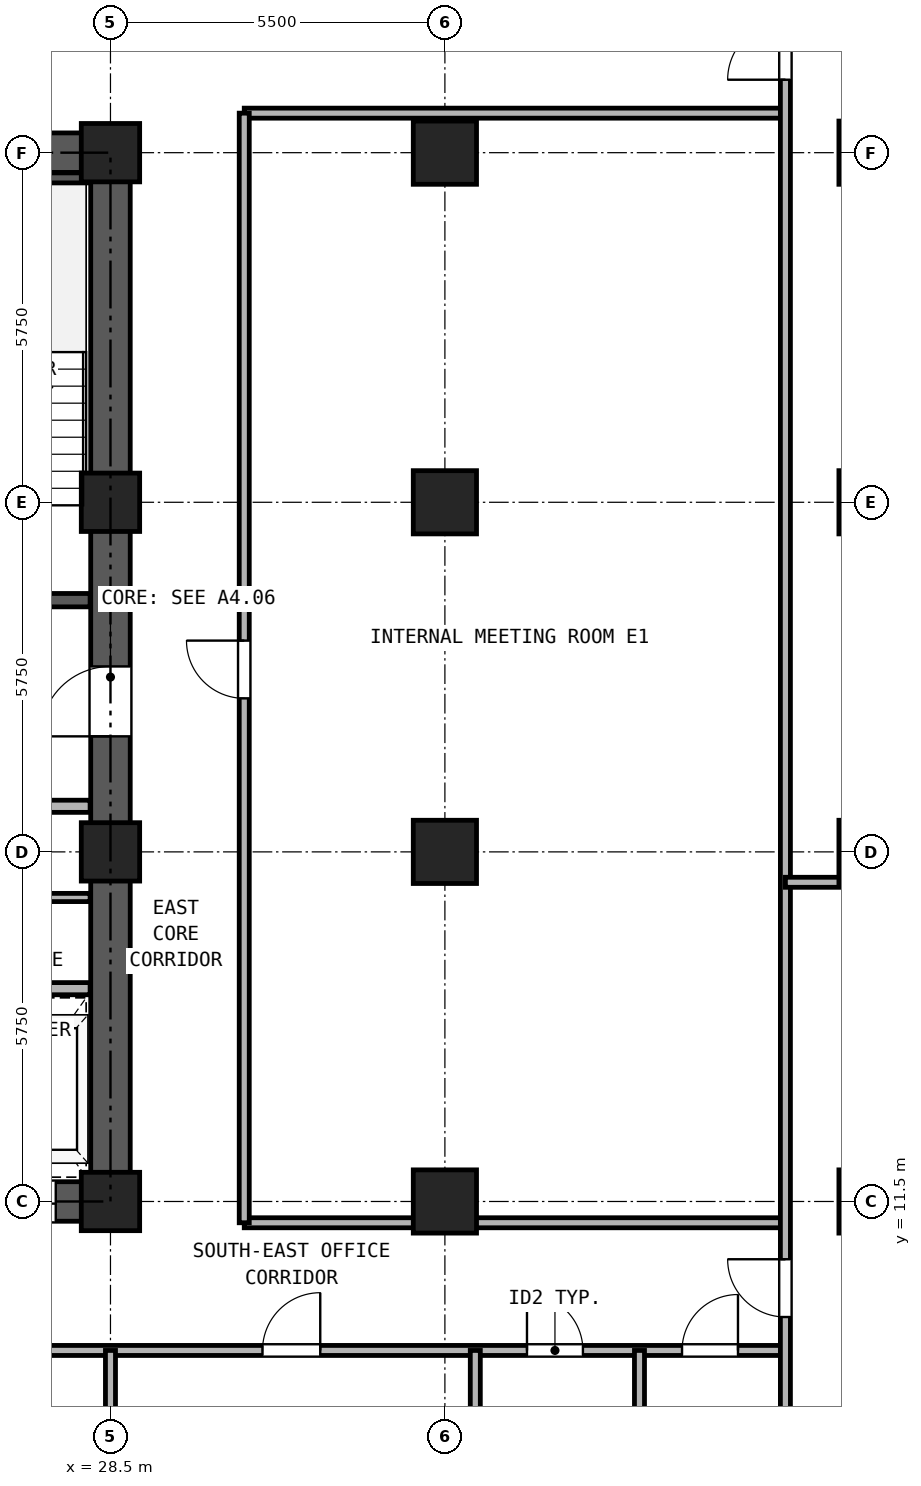
"""IFC4 building model, lengths in metres.
Left out: names, types, materials, properties, quantities, classifications, styles, units other than length and angle.
Written with IfcOpenShell. Run it as: python <this file> out.ifc"""

import sys

from ifc_helpers import new_model, si_unit, direction, frame, frame_2d, origin, origin_2d, place, context, subcontext, project, spatial, rectangle, hollow_rectangle, extrude, source, transform, mapped, element, fill, save


model = new_model("IFC4")
c1 = context("Model", 3, precision=1e-05, world=origin(), true_north=direction((0.0, 1.0)))
c2 = subcontext(c1, "Body", "Model", "MODEL_VIEW")
j1 = project(units=[si_unit("LENGTHUNIT", "METRE"), si_unit("PLANEANGLEUNIT", "RADIAN")], contexts=[c1])
p1 = place(None, origin())
s1 = spatial("IfcSite", under=j1, at=p1, CompositionType="ELEMENT")
p2 = place(p1, origin())
s2 = spatial("IfcBuilding", under=s1, at=p2, CompositionType="ELEMENT")
p3 = place(p2, frame((0.0, 0.0, 40.5)))
s3 = spatial("IfcBuildingStorey", under=s2, at=p3, CompositionType="ELEMENT", Elevation=40.5)
m1 = source(origin(), c2, "Body", "SweptSolid", [
    extrude(hollow_rectangle(XDim=0.96, YDim=0.96, WallThickness=0.06, at=origin_2d()), origin(), (0.0, 0.0, 1.0), 3.32),
])
for number, where, z_axis, x_axis in (
    (1, (28.5, 11.5, 0.0), (0.0, 0.0, 1.0), (1.0, 0.0, 0.0)),
    (2, (28.5, 17.25, 0.0), (0.0, 0.0, 1.0), (1.0, 0.0, 0.0)),
    (3, (28.5, 23.0, 0.0), (0.0, 0.0, 1.0), (1.0, 0.0, 0.0)),
    (4, (28.5, 28.75, 0.0), (0.0, 0.0, 1.0), (1.0, 0.0, 0.0)),
):
    element("IfcColumn", number, at=place(p3, frame(where, z_axis=z_axis, x_axis=x_axis)), inside=s3, PredefinedType="COLUMN", context=c2, shape_type="MappedRepresentation", body=[
        mapped(m1, transform((0.0, 0.0, 0.0), x_axis=(1.0, 0.0, 0.0), y_axis=(0.0, 1.0, 0.0), z_axis=(0.0, 0.0, 1.0), scale=1.0)),
    ])
m2 = source(origin(), c2, "Body", "SweptSolid", [
    extrude(hollow_rectangle(XDim=1.04, YDim=1.04, WallThickness=0.065, at=origin_2d()), origin(), (0.0, 0.0, 1.0), 3.32),
])
for number, where, z_axis, x_axis in (
    (5, (34.0, 11.5, 0.0), (0.0, 0.0, 1.0), (1.0, 0.0, 0.0)),
    (6, (34.0, 17.25, 0.0), (0.0, 0.0, 1.0), (1.0, 0.0, 0.0)),
    (7, (34.0, 23.0, 0.0), (0.0, 0.0, 1.0), (1.0, 0.0, 0.0)),
    (8, (34.0, 28.75, 0.0), (0.0, 0.0, 1.0), (1.0, 0.0, 0.0)),
    (9, (41.0, 11.5, 0.0), (0.0, 0.0, 1.0), (1.0, 0.0, 0.0)),
    (10, (41.0, 17.25, 0.0), (0.0, 0.0, 1.0), (1.0, 0.0, 0.0)),
    (11, (41.0, 23.0, 0.0), (0.0, 0.0, 1.0), (1.0, 0.0, 0.0)),
    (12, (41.0, 28.75, 0.0), (0.0, 0.0, 1.0), (1.0, 0.0, 0.0)),
):
    element("IfcColumn", number, at=place(p3, frame(where, z_axis=z_axis, x_axis=x_axis)), inside=s3, PredefinedType="COLUMN", context=c2, shape_type="MappedRepresentation", body=[
        mapped(m2, transform((0.0, 0.0, 0.0), x_axis=(1.0, 0.0, 0.0), y_axis=(0.0, 1.0, 0.0), z_axis=(0.0, 0.0, 1.0), scale=1.0)),
    ])
p4 = place(p3, frame((18.175, 11.5, 0.0), z_axis=(0.0, 0.0, 1.0), x_axis=(1.0, 0.0, 0.0)))
e13 = element("IfcWall", 13, at=p4, inside=s3, PredefinedType="SHEAR", context=c2, shape_type="SweptSolid", body=[
    extrude(rectangle(XDim=10.65, YDim=0.65, at=frame_2d((5.325, 0.0))), origin(), (0.0, 0.0, 1.0), 3.32),
])
p5 = place(p4, frame((1.195, 0.0, 0.0)))
e14 = element("IfcOpeningElement", 14, at=p5, cuts=e13, PredefinedType="OPENING", context=c2, shape_type="SweptSolid", body=[
    extrude(rectangle(XDim=1.1, YDim=2.25, at=frame_2d((0.55, 1.125))), frame((0.0, 0.335, 0.0), z_axis=(0.0, -1.0, 0.0), x_axis=(1.0, 0.0, 0.0)), (0.0, 0.0, 1.0), 0.67),
])
p6 = place(p4, frame((3.495, 0.0, 0.0)))
e15 = element("IfcOpeningElement", 15, at=p6, cuts=e13, PredefinedType="OPENING", context=c2, shape_type="SweptSolid", body=[
    extrude(rectangle(XDim=1.1, YDim=2.25, at=frame_2d((0.55, 1.125))), frame((0.0, 0.335, 0.0), z_axis=(0.0, -1.0, 0.0), x_axis=(1.0, 0.0, 0.0)), (0.0, 0.0, 1.0), 0.67),
])
p7 = place(p4, frame((5.925, 0.0, 0.0)))
e16 = element("IfcOpeningElement", 16, at=p7, cuts=e13, PredefinedType="OPENING", context=c2, shape_type="SweptSolid", body=[
    extrude(rectangle(XDim=1.1, YDim=2.25, at=frame_2d((0.55, 1.125))), frame((0.0, 0.335, 0.0), z_axis=(0.0, -1.0, 0.0), x_axis=(1.0, 0.0, 0.0)), (0.0, 0.0, 1.0), 0.67),
])
p8 = place(p4, frame((8.325, 0.0, 0.0)))
e17 = element("IfcOpeningElement", 17, at=p8, cuts=e13, PredefinedType="OPENING", context=c2, shape_type="SweptSolid", body=[
    extrude(rectangle(XDim=1.1, YDim=2.25, at=frame_2d((0.55, 1.125))), frame((0.0, 0.335, 0.0), z_axis=(0.0, -1.0, 0.0), x_axis=(1.0, 0.0, 0.0)), (0.0, 0.0, 1.0), 0.67),
])
p9 = place(p3, frame((18.175, 28.75, 0.0), z_axis=(0.0, 0.0, 1.0), x_axis=(1.0, 0.0, 0.0)))
e18 = element("IfcWall", 18, at=p9, inside=s3, PredefinedType="SHEAR", context=c2, shape_type="SweptSolid", body=[
    extrude(rectangle(XDim=10.65, YDim=0.65, at=frame_2d((5.325, 0.0))), origin(), (0.0, 0.0, 1.0), 3.32),
])
p10 = place(p9, frame((4.205, 0.0, 0.0)))
e19 = element("IfcOpeningElement", 19, at=p10, cuts=e18, PredefinedType="OPENING", context=c2, shape_type="SweptSolid", body=[
    extrude(rectangle(XDim=0.9, YDim=2.05, at=frame_2d((0.45, 1.025))), frame((0.0, 0.335, 0.0), z_axis=(0.0, -1.0, 0.0), x_axis=(1.0, 0.0, 0.0)), (0.0, 0.0, 1.0), 0.67),
])
p11 = place(p9, frame((5.745, 0.0, 0.0)))
e20 = element("IfcOpeningElement", 20, at=p11, cuts=e18, PredefinedType="OPENING", context=c2, shape_type="SweptSolid", body=[
    extrude(rectangle(XDim=0.9, YDim=2.05, at=frame_2d((0.45, 1.025))), frame((0.0, 0.335, 0.0), z_axis=(0.0, -1.0, 0.0), x_axis=(1.0, 0.0, 0.0)), (0.0, 0.0, 1.0), 0.67),
])
p12 = place(p3, frame((28.5, 11.825, 0.0), z_axis=(0.0, 0.0, 1.0), x_axis=(0.0, 1.0, 0.0)))
e21 = element("IfcWall", 21, at=p12, inside=s3, PredefinedType="SHEAR", context=c2, shape_type="SweptSolid", body=[
    extrude(rectangle(XDim=16.6, YDim=0.65, at=frame_2d((8.3, 0.0))), origin(), (0.0, 0.0, 1.0), 3.32),
])
p13 = place(p12, frame((7.325, 0.0, 0.0)))
e22 = element("IfcOpeningElement", 22, at=p13, cuts=e21, PredefinedType="OPENING", context=c2, shape_type="SweptSolid", body=[
    extrude(rectangle(XDim=1.15, YDim=2.2, at=frame_2d((0.575, 1.1))), frame((0.0, 0.335, 0.0), z_axis=(0.0, -1.0, 0.0), x_axis=(1.0, 0.0, 0.0)), (0.0, 0.0, 1.0), 0.67),
])
p14 = place(p3, frame((25.13, 28.335, 0.0), z_axis=(0.0, 0.0, 1.0), x_axis=(1.0, 0.0, 0.0)))
e23 = element("IfcWall", 23, at=p14, inside=s3, PredefinedType="PARTITIONING", context=c2, shape_type="SweptSolid", body=[
    extrude(rectangle(XDim=3.035, YDim=0.165, at=frame_2d((1.518, 0.0))), origin(), (0.0, 0.0, 1.0), 3.32),
])
p15 = place(p3, frame((25.13, 21.39, 0.0), z_axis=(0.0, 0.0, 1.0), x_axis=(1.0, 0.0, 0.0)))
e24 = element("IfcWall", 24, at=p15, inside=s3, PredefinedType="SOLIDWALL", context=c2, shape_type="SweptSolid", body=[
    extrude(rectangle(XDim=3.035, YDim=0.22, at=frame_2d((1.518, 0.0))), origin(), (0.0, 0.0, 1.0), 3.32),
])
p16 = place(p15, frame((0.92, 0.0, 0.0)))
e25 = element("IfcOpeningElement", 25, at=p16, cuts=e24, PredefinedType="OPENING", context=c2, shape_type="SweptSolid", body=[
    extrude(rectangle(XDim=1.15, YDim=2.2, at=frame_2d((0.575, 1.1))), frame((0.0, 0.12, 0.0), z_axis=(0.0, -1.0, 0.0), x_axis=(1.0, 0.0, 0.0)), (0.0, 0.0, 1.0), 0.24),
])
p17 = place(p3, frame((18.835, 18.0, 0.0), z_axis=(0.0, 0.0, 1.0), x_axis=(1.0, 0.0, 0.0)))
e26 = element("IfcWall", 26, at=p17, inside=s3, PredefinedType="PARTITIONING", context=c2, shape_type="SweptSolid", body=[
    extrude(rectangle(XDim=9.33, YDim=0.2, at=frame_2d((4.665, 0.0))), origin(), (0.0, 0.0, 1.0), 3.32),
])
p18 = place(p17, frame((0.415, 0.0, 0.0)))
e27 = element("IfcOpeningElement", 27, at=p18, cuts=e26, PredefinedType="OPENING", context=c2, shape_type="SweptSolid", body=[
    extrude(rectangle(XDim=1.3, YDim=2.3, at=frame_2d((0.65, 1.15))), frame((0.0, 0.11, 0.0), z_axis=(0.0, -1.0, 0.0), x_axis=(1.0, 0.0, 0.0)), (0.0, 0.0, 1.0), 0.22),
])
p19 = place(p17, frame((2.515, 0.0, 0.0)))
e28 = element("IfcOpeningElement", 28, at=p19, cuts=e26, PredefinedType="OPENING", context=c2, shape_type="SweptSolid", body=[
    extrude(rectangle(XDim=1.3, YDim=2.3, at=frame_2d((0.65, 1.15))), frame((0.0, 0.11, 0.0), z_axis=(0.0, -1.0, 0.0), x_axis=(1.0, 0.0, 0.0)), (0.0, 0.0, 1.0), 0.22),
])
p20 = place(p17, frame((7.015, 0.0, 0.0)))
e29 = element("IfcOpeningElement", 29, at=p20, cuts=e26, PredefinedType="OPENING", context=c2, shape_type="SweptSolid", body=[
    extrude(rectangle(XDim=1.0, YDim=2.15, at=frame_2d((0.5, 1.075))), frame((0.0, 0.11, 0.0), z_axis=(0.0, -1.0, 0.0), x_axis=(1.0, 0.0, 0.0)), (0.0, 0.0, 1.0), 0.22),
])
p21 = place(p3, frame((18.835, 15.0, 0.0), z_axis=(0.0, 0.0, 1.0), x_axis=(1.0, 0.0, 0.0)))
e30 = element("IfcWall", 30, at=p21, inside=s3, PredefinedType="PARTITIONING", context=c2, shape_type="SweptSolid", body=[
    extrude(rectangle(XDim=9.33, YDim=0.2, at=frame_2d((4.665, 0.0))), origin(), (0.0, 0.0, 1.0), 3.32),
])
p22 = place(p3, frame((23.3, 16.5, 0.0), z_axis=(0.0, 0.0, 1.0), x_axis=(1.0, 0.0, 0.0)))
e31 = element("IfcWall", 31, at=p22, inside=s3, PredefinedType="PARTITIONING", context=c2, shape_type="SweptSolid", body=[
    extrude(rectangle(XDim=4.865, YDim=0.135, at=frame_2d((2.433, 0.0))), origin(), (0.0, 0.0, 1.0), 3.32),
])
p23 = place(p22, frame((2.55, 0.0, 0.0)))
e32 = element("IfcOpeningElement", 32, at=p23, cuts=e31, PredefinedType="OPENING", context=c2, shape_type="SweptSolid", body=[
    extrude(rectangle(XDim=0.9, YDim=2.05, at=frame_2d((0.45, 1.025))), frame((0.0, 0.077, 0.0), z_axis=(0.0, -1.0, 0.0), x_axis=(1.0, 0.0, 0.0)), (0.0, 0.0, 1.0), 0.155),
])
p24 = place(p3, frame((7.4, 9.05, 0.0), z_axis=(0.0, 0.0, 1.0), x_axis=(1.0, 0.0, 0.0)))
e33 = element("IfcWall", 33, at=p24, inside=s3, PredefinedType="PARTITIONING", context=c2, shape_type="SweptSolid", body=[
    extrude(rectangle(XDim=32.2, YDim=0.165, at=frame_2d((16.1, 0.0))), origin(), (0.0, 0.0, 1.0), 3.32),
])
p25 = place(p24, frame((5.8, 0.0, 0.0)))
e34 = element("IfcOpeningElement", 34, at=p25, cuts=e33, PredefinedType="OPENING", context=c2, shape_type="SweptSolid", body=[
    extrude(rectangle(XDim=0.95, YDim=2.15, at=frame_2d((0.475, 1.075))), frame((0.0, 0.093, 0.0), z_axis=(0.0, -1.0, 0.0), x_axis=(1.0, 0.0, 0.0)), (0.0, 0.0, 1.0), 0.185),
])
p26 = place(p24, frame((16.35, 0.0, 0.0)))
e35 = element("IfcOpeningElement", 35, at=p26, cuts=e33, PredefinedType="OPENING", context=c2, shape_type="SweptSolid", body=[
    extrude(rectangle(XDim=0.95, YDim=2.15, at=frame_2d((0.475, 1.075))), frame((0.0, 0.093, 0.0), z_axis=(0.0, -1.0, 0.0), x_axis=(1.0, 0.0, 0.0)), (0.0, 0.0, 1.0), 0.185),
])
p27 = place(p24, frame((23.6, 0.0, 0.0)))
e36 = element("IfcOpeningElement", 36, at=p27, cuts=e33, PredefinedType="OPENING", context=c2, shape_type="SweptSolid", body=[
    extrude(rectangle(XDim=0.95, YDim=2.15, at=frame_2d((0.475, 1.075))), frame((0.0, 0.093, 0.0), z_axis=(0.0, -1.0, 0.0), x_axis=(1.0, 0.0, 0.0)), (0.0, 0.0, 1.0), 0.185),
])
p28 = place(p24, frame((27.95, 0.0, 0.0)))
e37 = element("IfcOpeningElement", 37, at=p28, cuts=e33, PredefinedType="OPENING", context=c2, shape_type="SweptSolid", body=[
    extrude(rectangle(XDim=0.92, YDim=2.1, at=frame_2d((0.46, 1.05))), frame((0.0, 0.093, 0.0), z_axis=(0.0, -1.0, 0.0), x_axis=(1.0, 0.0, 0.0)), (0.0, 0.0, 1.0), 0.185),
])
p29 = place(p24, frame((30.5, 0.0, 0.0)))
e38 = element("IfcOpeningElement", 38, at=p29, cuts=e33, PredefinedType="OPENING", context=c2, shape_type="SweptSolid", body=[
    extrude(rectangle(XDim=0.92, YDim=2.1, at=frame_2d((0.46, 1.05))), frame((0.0, 0.093, 0.0), z_axis=(0.0, -1.0, 0.0), x_axis=(1.0, 0.0, 0.0)), (0.0, 0.0, 1.0), 0.185),
])
for number, where, z_axis, x_axis in (
    (39, (30.7, 11.15, 0.0), (0.0, 0.0, 1.0), (1.0, 0.0, 0.0)),
    (40, (30.7, 29.4, 0.0), (0.0, 0.0, 1.0), (1.0, 0.0, 0.0)),
):
    element("IfcWall", number, at=place(p3, frame(where, z_axis=z_axis, x_axis=x_axis)), inside=s3, PredefinedType="PARTITIONING", context=c2, shape_type="SweptSolid", body=[
        extrude(rectangle(XDim=8.9, YDim=0.165, at=frame_2d((4.45, 0.0))), origin(), (0.0, 0.0, 1.0), 3.32),
    ])
p30 = place(p3, frame((30.7, 11.15, 0.0), z_axis=(0.0, 0.0, 1.0), x_axis=(0.0, 1.0, 0.0)))
e41 = element("IfcWall", 41, at=p30, inside=s3, PredefinedType="PARTITIONING", context=c2, shape_type="SweptSolid", body=[
    extrude(rectangle(XDim=18.25, YDim=0.165, at=frame_2d((9.125, 0.0))), origin(), (0.0, 0.0, 1.0), 3.32),
])
p31 = place(p30, frame((8.625, 0.0, 0.0)))
e42 = element("IfcOpeningElement", 42, at=p31, cuts=e41, PredefinedType="OPENING", context=c2, shape_type="SweptSolid", body=[
    extrude(rectangle(XDim=0.95, YDim=2.15, at=frame_2d((0.475, 1.075))), frame((0.0, 0.093, 0.0), z_axis=(0.0, -1.0, 0.0), x_axis=(1.0, 0.0, 0.0)), (0.0, 0.0, 1.0), 0.185),
])
p32 = place(p3, frame((39.6, 0.16, 0.0), z_axis=(0.0, 0.0, 1.0), x_axis=(0.0, 1.0, 0.0)))
e43 = element("IfcWall", 43, at=p32, inside=s3, PredefinedType="PARTITIONING", context=c2, shape_type="SweptSolid", body=[
    extrude(rectangle(XDim=40.18, YDim=0.165, at=frame_2d((20.09, 0.0))), origin(), (0.0, 0.0, 1.0), 3.32),
])
p33 = place(p32, frame((9.44, 0.0, 0.0)))
e44 = element("IfcOpeningElement", 44, at=p33, cuts=e43, PredefinedType="OPENING", context=c2, shape_type="SweptSolid", body=[
    extrude(rectangle(XDim=0.95, YDim=2.15, at=frame_2d((0.475, 1.075))), frame((0.0, 0.093, 0.0), z_axis=(0.0, -1.0, 0.0), x_axis=(1.0, 0.0, 0.0)), (0.0, 0.0, 1.0), 0.185),
])
p34 = place(p32, frame((29.79, 0.0, 0.0)))
e45 = element("IfcOpeningElement", 45, at=p34, cuts=e43, PredefinedType="OPENING", context=c2, shape_type="SweptSolid", body=[
    extrude(rectangle(XDim=0.95, YDim=2.15, at=frame_2d((0.475, 1.075))), frame((0.0, 0.093, 0.0), z_axis=(0.0, -1.0, 0.0), x_axis=(1.0, 0.0, 0.0)), (0.0, 0.0, 1.0), 0.185),
])
p35 = place(p3, frame((28.5, 0.16, 0.0), z_axis=(0.0, 0.0, 1.0), x_axis=(0.0, 1.0, 0.0)))
e46 = element("IfcWall", 46, at=p35, inside=s3, PredefinedType="PARTITIONING", context=c2, shape_type="SweptSolid", body=[
    extrude(rectangle(XDim=8.89, YDim=0.165, at=frame_2d((4.445, 0.0))), origin(), (0.0, 0.0, 1.0), 2.539),
])
for number, where, z_axis, x_axis in (
    (47, (34.5, 0.16, 0.0), (0.0, 0.0, 1.0), (0.0, 1.0, 0.0)),
    (48, (37.2, 0.16, 0.0), (0.0, 0.0, 1.0), (0.0, 1.0, 0.0)),
):
    element("IfcWall", number, at=place(p3, frame(where, z_axis=z_axis, x_axis=x_axis)), inside=s3, PredefinedType="PARTITIONING", context=c2, shape_type="SweptSolid", body=[
        extrude(rectangle(XDim=8.89, YDim=0.165, at=frame_2d((4.445, 0.0))), origin(), (0.0, 0.0, 1.0), 3.32),
    ])
p36 = place(p3, frame((39.6, 16.75, 0.0), z_axis=(0.0, 0.0, 1.0), x_axis=(1.0, 0.0, 0.0)))
e49 = element("IfcWall", 49, at=p36, inside=s3, PredefinedType="PARTITIONING", context=c2, shape_type="SweptSolid", body=[
    extrude(rectangle(XDim=7.24, YDim=0.165, at=frame_2d((3.62, 0.0))), origin(), (0.0, 0.0, 1.0), 3.32),
])
p37 = place(p13, origin())
e50 = element("IfcDoor", 50, at=p37, inside=s3, OperationType="SINGLE_SWING_LEFT", PredefinedType="DOOR", context=c2, shape_type="SweptSolid", body=[
    extrude(rectangle(XDim=1.15, YDim=2.2, at=frame_2d((0.575, 1.1))), frame((0.0, 0.025, 0.0), z_axis=(0.0, -1.0, 0.0), x_axis=(1.0, 0.0, 0.0)), (0.0, 0.0, 1.0), 0.05),
])
fill(e22, e50)
p38 = place(p8, frame((1.1, 0.0, 0.0), z_axis=(0.0, 0.0, 1.0), x_axis=(-1.0, 0.0, 0.0)))
e51 = element("IfcDoor", 51, at=p38, inside=s3, OperationType="DOUBLE_DOOR_SLIDING", PredefinedType="DOOR", context=c2, shape_type="SweptSolid", body=[
    extrude(rectangle(XDim=1.1, YDim=2.25, at=frame_2d((0.55, 1.125))), frame((0.0, 0.025, 0.0), z_axis=(0.0, -1.0, 0.0), x_axis=(1.0, 0.0, 0.0)), (0.0, 0.0, 1.0), 0.05),
])
fill(e17, e51)
p39 = place(p27, frame((0.95, 0.0, 0.0), z_axis=(0.0, 0.0, 1.0), x_axis=(-1.0, 0.0, 0.0)))
e52 = element("IfcDoor", 52, at=p39, inside=s3, OperationType="SINGLE_SWING_RIGHT", PredefinedType="DOOR", context=c2, shape_type="SweptSolid", body=[
    extrude(rectangle(XDim=0.95, YDim=2.15, at=frame_2d((0.475, 1.075))), frame((0.0, 0.025, 0.0), z_axis=(0.0, -1.0, 0.0), x_axis=(1.0, 0.0, 0.0)), (0.0, 0.0, 1.0), 0.05),
])
fill(e36, e52)
p40 = place(p28, frame((0.92, 0.0, 0.0), z_axis=(0.0, 0.0, 1.0), x_axis=(-1.0, 0.0, 0.0)))
e53 = element("IfcDoor", 53, at=p40, inside=s3, OperationType="SINGLE_SWING_LEFT", PredefinedType="DOOR", context=c2, shape_type="SweptSolid", body=[
    extrude(rectangle(XDim=0.92, YDim=2.1, at=frame_2d((0.46, 1.05))), frame((0.0, 0.025, 0.0), z_axis=(0.0, -1.0, 0.0), x_axis=(1.0, 0.0, 0.0)), (0.0, 0.0, 1.0), 0.05),
])
fill(e37, e53)
p41 = place(p29, frame((0.92, 0.0, 0.0), z_axis=(0.0, 0.0, 1.0), x_axis=(-1.0, 0.0, 0.0)))
e54 = element("IfcDoor", 54, at=p41, inside=s3, OperationType="SINGLE_SWING_RIGHT", PredefinedType="DOOR", context=c2, shape_type="SweptSolid", body=[
    extrude(rectangle(XDim=0.92, YDim=2.1, at=frame_2d((0.46, 1.05))), frame((0.0, 0.025, 0.0), z_axis=(0.0, -1.0, 0.0), x_axis=(1.0, 0.0, 0.0)), (0.0, 0.0, 1.0), 0.05),
])
fill(e38, e54)
p42 = place(p33, origin())
e55 = element("IfcDoor", 55, at=p42, inside=s3, OperationType="SINGLE_SWING_RIGHT", PredefinedType="DOOR", context=c2, shape_type="SweptSolid", body=[
    extrude(rectangle(XDim=0.95, YDim=2.15, at=frame_2d((0.475, 1.075))), frame((0.0, 0.025, 0.0), z_axis=(0.0, -1.0, 0.0), x_axis=(1.0, 0.0, 0.0)), (0.0, 0.0, 1.0), 0.05),
])
fill(e44, e55)
p43 = place(p34, origin())
e56 = element("IfcDoor", 56, at=p43, inside=s3, OperationType="SINGLE_SWING_LEFT", PredefinedType="DOOR", context=c2, shape_type="SweptSolid", body=[
    extrude(rectangle(XDim=0.95, YDim=2.15, at=frame_2d((0.475, 1.075))), frame((0.0, 0.025, 0.0), z_axis=(0.0, -1.0, 0.0), x_axis=(1.0, 0.0, 0.0)), (0.0, 0.0, 1.0), 0.05),
])
fill(e45, e56)
p44 = place(p31, origin())
e57 = element("IfcDoor", 57, at=p44, inside=s3, OperationType="SINGLE_SWING_RIGHT", PredefinedType="DOOR", context=c2, shape_type="SweptSolid", body=[
    extrude(rectangle(XDim=0.95, YDim=2.15, at=frame_2d((0.475, 1.075))), frame((0.0, 0.025, 0.0), z_axis=(0.0, -1.0, 0.0), x_axis=(1.0, 0.0, 0.0)), (0.0, 0.0, 1.0), 0.05),
])
fill(e42, e57)
save(model, sys.argv[1])
